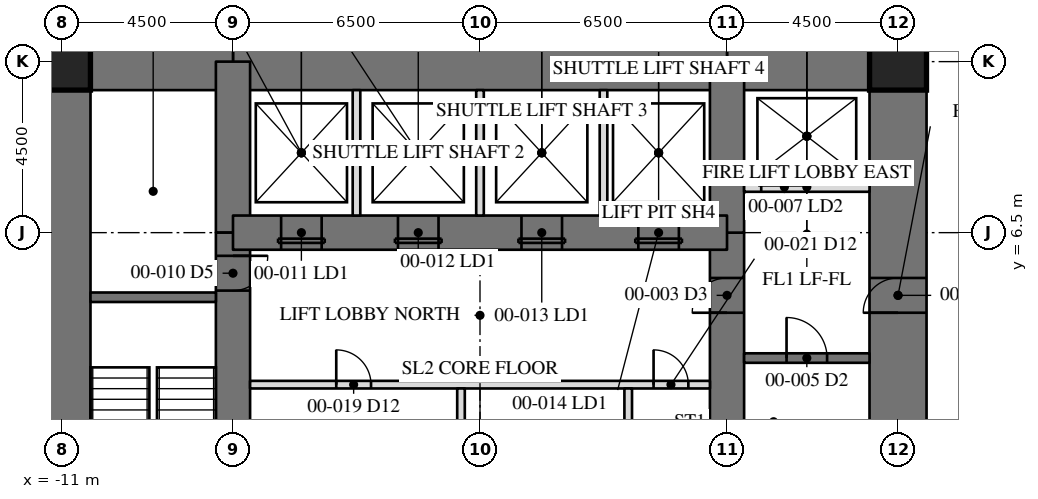
"""IFC4 building model, lengths in metres.
Left out: names, types, materials, properties, quantities, classifications, styles, units other than length and angle.
Written with IfcOpenShell. Run it as: python <this file> out.ifc"""

import sys

from ifc_helpers import new_model, si_unit, direction, frame, frame_2d, origin, origin_2d, place, context, subcontext, project, spatial, rectangle, hollow_rectangle, extrude, element, fill, save


model = new_model("IFC4")
c1 = context("Model", 3, precision=1e-05, world=origin(), true_north=direction((0.0, 1.0)))
c2 = subcontext(c1, "Body", "Model", "MODEL_VIEW")
j1 = project(units=[si_unit("LENGTHUNIT", "METRE"), si_unit("PLANEANGLEUNIT", "RADIAN")], contexts=[c1])
p1 = place(None, origin())
s1 = spatial("IfcSite", under=j1, at=p1, CompositionType="ELEMENT")
p2 = place(p1, origin())
s2 = spatial("IfcBuilding", under=s1, at=p2, CompositionType="ELEMENT")
p3 = place(p2, origin())
s3 = spatial("IfcBuildingStorey", under=s2, at=p3, CompositionType="ELEMENT", Elevation=0.0)
p4 = place(p3, frame((11.0, -11.0, -0.3), z_axis=(0.0, 0.0, 1.0), x_axis=(0.0, 1.0, 0.0)))
e1 = element("IfcWall", 1, at=p4, inside=s3, PredefinedType="SHEAR", context=c2, shape_type="SweptSolid", body=[
    extrude(rectangle(XDim=22.0, YDim=1.5, at=frame_2d((11.0, 0.0))), origin(), (0.0, 0.0, 1.0), 6.3),
])
p5 = place(p4, frame((15.393, 0.0, 0.3)))
e2 = element("IfcOpeningElement", 2, at=p5, cuts=e1, PredefinedType="OPENING", context=c2, shape_type="SweptSolid", body=[
    extrude(rectangle(XDim=0.915, YDim=2.134, at=frame_2d((0.458, 1.067))), frame((0.0, 0.76, 0.0), z_axis=(0.0, -1.0, 0.0), x_axis=(1.0, 0.0, 0.0)), (0.0, 0.0, 1.0), 1.52),
])
p6 = place(p3, frame((-11.0, 11.0, -0.3), z_axis=(0.0, 0.0, 1.0), x_axis=(0.0, -1.0, 0.0)))
e3 = element("IfcWall", 3, at=p6, inside=s3, PredefinedType="SHEAR", context=c2, shape_type="SweptSolid", body=[
    extrude(rectangle(XDim=22.0, YDim=1.5, at=frame_2d((11.0, 0.0))), origin(), (0.0, 0.0, 1.0), 6.3),
])
p7 = place(p6, frame((15.393, 0.0, 0.3)))
e4 = element("IfcOpeningElement", 4, at=p7, cuts=e3, PredefinedType="OPENING", context=c2, shape_type="SweptSolid", body=[
    extrude(rectangle(XDim=0.915, YDim=2.134, at=frame_2d((0.458, 1.067))), frame((0.0, 0.76, 0.0), z_axis=(0.0, -1.0, 0.0), x_axis=(1.0, 0.0, 0.0)), (0.0, 0.0, 1.0), 1.52),
])
p8 = place(p3, frame((11.0, 11.0, -0.3), z_axis=(0.0, 0.0, 1.0), x_axis=(-1.0, 0.0, 0.0)))
e5 = element("IfcWall", 5, at=p8, inside=s3, PredefinedType="SHEAR", context=c2, shape_type="SweptSolid", body=[
    extrude(rectangle(XDim=4.5, YDim=1.5, at=frame_2d((2.25, 0.0))), origin(), (0.0, 0.0, 1.0), 6.3),
])
p9 = place(p3, frame((6.5, 11.0, -0.3), z_axis=(0.0, 0.0, 1.0), x_axis=(-1.0, 0.0, 0.0)))
e6 = element("IfcWall", 6, at=p9, inside=s3, PredefinedType="SHEAR", context=c2, shape_type="SweptSolid", body=[
    extrude(rectangle(XDim=13.0, YDim=1.5, at=frame_2d((6.5, 0.0))), origin(), (0.0, 0.0, 1.0), 6.3),
])
p10 = place(p3, frame((-6.5, 11.0, -0.3), z_axis=(0.0, 0.0, 1.0), x_axis=(-1.0, 0.0, 0.0)))
e7 = element("IfcWall", 7, at=p10, inside=s3, PredefinedType="SHEAR", context=c2, shape_type="SweptSolid", body=[
    extrude(rectangle(XDim=4.5, YDim=1.5, at=frame_2d((2.25, 0.0))), origin(), (0.0, 0.0, 1.0), 6.3),
])
p11 = place(p3, frame((6.5, -6.5, -0.3), z_axis=(0.0, 0.0, 1.0), x_axis=(0.0, 1.0, 0.0)))
e8 = element("IfcWall", 8, at=p11, inside=s3, PredefinedType="SHEAR", context=c2, shape_type="SweptSolid", body=[
    extrude(rectangle(XDim=13.0, YDim=0.9, at=frame_2d((6.5, 0.0))), origin(), (0.0, 0.0, 1.0), 6.3),
])
p12 = place(p11, frame((10.893, 0.0, 0.3)))
e9 = element("IfcOpeningElement", 9, at=p12, cuts=e8, PredefinedType="OPENING", context=c2, shape_type="SweptSolid", body=[
    extrude(rectangle(XDim=0.915, YDim=2.134, at=frame_2d((0.458, 1.067))), frame((0.0, 0.46, 0.0), z_axis=(0.0, -1.0, 0.0), x_axis=(1.0, 0.0, 0.0)), (0.0, 0.0, 1.0), 0.92),
])
p13 = place(p11, frame((0.61, 0.0, 0.3)))
e10 = element("IfcOpeningElement", 10, at=p13, cuts=e8, PredefinedType="OPENING", context=c2, shape_type="SweptSolid", body=[
    extrude(rectangle(XDim=0.915, YDim=2.134, at=frame_2d((0.458, 1.067))), frame((0.0, 0.46, 0.0), z_axis=(0.0, -1.0, 0.0), x_axis=(1.0, 0.0, 0.0)), (0.0, 0.0, 1.0), 0.92),
])
for number, where, z_axis, x_axis in (
    (11, (6.5, 6.5, -0.3), (0.0, 0.0, 1.0), (0.0, 1.0, 0.0)),
    (12, (-6.5, 11.0, -0.3), (0.0, 0.0, 1.0), (0.0, -1.0, 0.0)),
):
    element("IfcWall", number, at=place(p3, frame(where, z_axis=z_axis, x_axis=x_axis)), inside=s3, PredefinedType="SHEAR", context=c2, shape_type="SweptSolid", body=[
        extrude(rectangle(XDim=4.5, YDim=0.9, at=frame_2d((2.25, 0.0))), origin(), (0.0, 0.0, 1.0), 6.3),
    ])
p14 = place(p3, frame((-6.5, 6.5, -0.3), z_axis=(0.0, 0.0, 1.0), x_axis=(0.0, -1.0, 0.0)))
e13 = element("IfcWall", 13, at=p14, inside=s3, PredefinedType="SHEAR", context=c2, shape_type="SweptSolid", body=[
    extrude(rectangle(XDim=13.0, YDim=0.9, at=frame_2d((6.5, 0.0))), origin(), (0.0, 0.0, 1.0), 6.3),
])
p15 = place(p14, frame((10.893, 0.0, 0.3)))
e14 = element("IfcOpeningElement", 14, at=p15, cuts=e13, PredefinedType="OPENING", context=c2, shape_type="SweptSolid", body=[
    extrude(rectangle(XDim=0.915, YDim=2.134, at=frame_2d((0.458, 1.067))), frame((0.0, 0.46, 0.0), z_axis=(0.0, -1.0, 0.0), x_axis=(1.0, 0.0, 0.0)), (0.0, 0.0, 1.0), 0.92),
])
p16 = place(p14, frame((0.61, 0.0, 0.3)))
e15 = element("IfcOpeningElement", 15, at=p16, cuts=e13, PredefinedType="OPENING", context=c2, shape_type="SweptSolid", body=[
    extrude(rectangle(XDim=0.915, YDim=2.134, at=frame_2d((0.458, 1.067))), frame((0.0, 0.46, 0.0), z_axis=(0.0, -1.0, 0.0), x_axis=(1.0, 0.0, 0.0)), (0.0, 0.0, 1.0), 0.92),
])
p17 = place(p3, frame((6.5, 6.5, -0.3), z_axis=(0.0, 0.0, 1.0), x_axis=(-1.0, 0.0, 0.0)))
e16 = element("IfcWall", 16, at=p17, inside=s3, PredefinedType="SHEAR", context=c2, shape_type="SweptSolid", body=[
    extrude(rectangle(XDim=13.0, YDim=0.9, at=frame_2d((6.5, 0.0))), origin(), (0.0, 0.0, 1.0), 6.3),
])
p18 = place(p17, frame((10.667, 0.0, 0.3)))
e17 = element("IfcOpeningElement", 17, at=p18, cuts=e16, PredefinedType="OPENING", context=c2, shape_type="SweptSolid", body=[
    extrude(rectangle(XDim=1.067, YDim=2.134, at=frame_2d((0.533, 1.067))), frame((0.0, 0.46, 0.0), z_axis=(0.0, -1.0, 0.0), x_axis=(1.0, 0.0, 0.0)), (0.0, 0.0, 1.0), 0.92),
])
p19 = place(p17, frame((7.592, 0.0, 0.3)))
e18 = element("IfcOpeningElement", 18, at=p19, cuts=e16, PredefinedType="OPENING", context=c2, shape_type="SweptSolid", body=[
    extrude(rectangle(XDim=1.067, YDim=2.134, at=frame_2d((0.533, 1.067))), frame((0.0, 0.46, 0.0), z_axis=(0.0, -1.0, 0.0), x_axis=(1.0, 0.0, 0.0)), (0.0, 0.0, 1.0), 0.92),
])
p20 = place(p17, frame((4.342, 0.0, 0.3)))
e19 = element("IfcOpeningElement", 19, at=p20, cuts=e16, PredefinedType="OPENING", context=c2, shape_type="SweptSolid", body=[
    extrude(rectangle(XDim=1.067, YDim=2.134, at=frame_2d((0.533, 1.067))), frame((0.0, 0.46, 0.0), z_axis=(0.0, -1.0, 0.0), x_axis=(1.0, 0.0, 0.0)), (0.0, 0.0, 1.0), 0.92),
])
p21 = place(p17, frame((1.267, 0.0, 0.3)))
e20 = element("IfcOpeningElement", 20, at=p21, cuts=e16, PredefinedType="OPENING", context=c2, shape_type="SweptSolid", body=[
    extrude(rectangle(XDim=1.067, YDim=2.134, at=frame_2d((0.533, 1.067))), frame((0.0, 0.46, 0.0), z_axis=(0.0, -1.0, 0.0), x_axis=(1.0, 0.0, 0.0)), (0.0, 0.0, 1.0), 0.92),
])
for number, where, z_axis, x_axis in (
    (21, (11.0, 11.0, -0.3), (0.0, 0.0, 1.0), (1.0, 0.0, 0.0)),
    (22, (-11.0, 11.0, -0.3), (0.0, 0.0, 1.0), (1.0, 0.0, 0.0)),
):
    element("IfcColumn", number, at=place(p3, frame(where, z_axis=z_axis, x_axis=x_axis)), inside=s3, PredefinedType="COLUMN", context=c2, shape_type="SweptSolid", body=[
        extrude(hollow_rectangle(XDim=1.499, YDim=1.499, WallThickness=0.102, at=origin_2d()), origin(), (0.0, 0.0, 1.0), 6.3),
    ])
p22 = place(p3, frame((-6.95, 4.8, 0.0), z_axis=(0.0, 0.0, 1.0), x_axis=(-1.0, 0.0, 0.0)))
e23 = element("IfcWall", 23, at=p22, inside=s3, PredefinedType="SOLIDWALL", context=c2, shape_type="SweptSolid", body=[
    extrude(rectangle(XDim=3.3, YDim=0.25, at=frame_2d((1.65, 0.0))), origin(), (0.0, 0.0, 1.0), 5.81),
])
p23 = place(p3, frame((6.95, 3.2, 0.0), z_axis=(0.0, 0.0, 1.0), x_axis=(1.0, 0.0, 0.0)))
e24 = element("IfcWall", 24, at=p23, inside=s3, PredefinedType="SOLIDWALL", context=c2, shape_type="SweptSolid", body=[
    extrude(rectangle(XDim=3.3, YDim=0.25, at=frame_2d((1.65, 0.0))), origin(), (0.0, 0.0, 1.0), 5.81),
])
p24 = place(p23, frame((1.116, 0.0, 0.3)))
e25 = element("IfcOpeningElement", 25, at=p24, cuts=e24, PredefinedType="OPENING", context=c2, shape_type="SweptSolid", body=[
    extrude(rectangle(XDim=1.067, YDim=2.134, at=frame_2d((0.533, 1.067))), frame((0.0, 0.135, 0.0), z_axis=(0.0, -1.0, 0.0), x_axis=(1.0, 0.0, 0.0)), (0.0, 0.0, 1.0), 0.27),
])
p25 = place(p3, frame((6.95, 7.7, 0.0), z_axis=(0.0, 0.0, 1.0), x_axis=(1.0, 0.0, 0.0)))
e26 = element("IfcWall", 26, at=p25, inside=s3, PredefinedType="PARTITIONING", context=c2, shape_type="SweptSolid", body=[
    extrude(rectangle(XDim=3.3, YDim=0.25, at=frame_2d((1.65, 0.0))), origin(), (0.0, 0.0, 1.0), 5.81),
])
p26 = place(p25, frame((0.45, 0.0, 0.3)))
e27 = element("IfcOpeningElement", 27, at=p26, cuts=e26, PredefinedType="OPENING", context=c2, shape_type="SweptSolid", body=[
    extrude(rectangle(XDim=1.219, YDim=2.134, at=frame_2d((0.609, 1.067))), frame((0.0, 0.135, 0.0), z_axis=(0.0, -1.0, 0.0), x_axis=(1.0, 0.0, 0.0)), (0.0, 0.0, 1.0), 0.27),
])
p27 = place(p3, frame((-6.05, 2.5, 0.0), z_axis=(0.0, 0.0, 1.0), x_axis=(1.0, 0.0, 0.0)))
e28 = element("IfcWall", 28, at=p27, inside=s3, PredefinedType="PARTITIONING", context=c2, shape_type="SweptSolid", body=[
    extrude(rectangle(XDim=12.1, YDim=0.2, at=frame_2d((6.05, 0.0))), origin(), (0.0, 0.0, 1.0), 5.81),
])
p28 = place(p27, frame((2.268, 0.0, 0.3)))
e29 = element("IfcOpeningElement", 29, at=p28, cuts=e28, PredefinedType="OPENING", context=c2, shape_type="SweptSolid", body=[
    extrude(rectangle(XDim=0.915, YDim=2.134, at=frame_2d((0.458, 1.067))), frame((0.0, 0.11, 0.0), z_axis=(0.0, -1.0, 0.0), x_axis=(1.0, 0.0, 0.0)), (0.0, 0.0, 1.0), 0.22),
])
p29 = place(p27, frame((10.617, 0.0, 0.3)))
e30 = element("IfcOpeningElement", 30, at=p29, cuts=e28, PredefinedType="OPENING", context=c2, shape_type="SweptSolid", body=[
    extrude(rectangle(XDim=0.915, YDim=2.134, at=frame_2d((0.458, 1.067))), frame((0.0, 0.11, 0.0), z_axis=(0.0, -1.0, 0.0), x_axis=(1.0, 0.0, 0.0)), (0.0, 0.0, 1.0), 0.22),
])
for number, where, z_axis, x_axis in (
    (31, (-3.25, 6.95, 0.0), (0.0, 0.0, 1.0), (0.0, 1.0, 0.0)),
    (32, (0.0, 6.95, 0.0), (0.0, 0.0, 1.0), (0.0, 1.0, 0.0)),
    (33, (3.25, 6.95, 0.0), (0.0, 0.0, 1.0), (0.0, 1.0, 0.0)),
):
    element("IfcWall", number, at=place(p3, frame(where, z_axis=z_axis, x_axis=x_axis)), inside=s3, PredefinedType="PARTITIONING", context=c2, shape_type="SweptSolid", body=[
        extrude(rectangle(XDim=3.3, YDim=0.2, at=frame_2d((1.65, 0.0))), origin(), (0.0, 0.0, 1.0), 5.81),
    ])
for number, where, z_axis, x_axis in (
    (34, (-0.5, -2.4, 0.0), (0.0, 0.0, 1.0), (0.0, 1.0, 0.0)),
    (35, (3.9, -2.4, 0.0), (0.0, 0.0, 1.0), (0.0, 1.0, 0.0)),
):
    element("IfcWall", number, at=place(p3, frame(where, z_axis=z_axis, x_axis=x_axis)), inside=s3, PredefinedType="PARTITIONING", context=c2, shape_type="SweptSolid", body=[
        extrude(rectangle(XDim=4.8, YDim=0.2, at=frame_2d((2.4, 0.0))), origin(), (0.0, 0.0, 1.0), 5.81),
    ])
p30 = place(p5, origin())
e36 = element("IfcDoor", 36, at=p30, inside=s3, OperationType="SINGLE_SWING_RIGHT", PredefinedType="DOOR", context=c2, shape_type="SweptSolid", body=[
    extrude(rectangle(XDim=0.915, YDim=2.134, at=frame_2d((0.458, 1.067))), frame((0.0, -0.675, 0.0), z_axis=(0.0, -1.0, 0.0), x_axis=(1.0, 0.0, 0.0)), (0.0, 0.0, 1.0), 0.05),
])
fill(e2, e36)
p31 = place(p12, origin())
e37 = element("IfcDoor", 37, at=p31, inside=s3, OperationType="SINGLE_SWING_RIGHT", PredefinedType="DOOR", context=c2, shape_type="SweptSolid", body=[
    extrude(rectangle(XDim=0.915, YDim=2.134, at=frame_2d((0.458, 1.067))), frame((0.0, -0.375, 0.0), z_axis=(0.0, -1.0, 0.0), x_axis=(1.0, 0.0, 0.0)), (0.0, 0.0, 1.0), 0.05),
])
fill(e9, e37)
p32 = place(p24, origin())
e38 = element("IfcDoor", 38, at=p32, inside=s3, OperationType="SINGLE_SWING_LEFT", PredefinedType="DOOR", context=c2, shape_type="SweptSolid", body=[
    extrude(rectangle(XDim=1.067, YDim=2.134, at=frame_2d((0.533, 1.067))), frame((0.0, 0.025, 0.0), z_axis=(0.0, -1.0, 0.0), x_axis=(1.0, 0.0, 0.0)), (0.0, 0.0, 1.0), 0.05),
])
fill(e25, e38)
p33 = place(p26, origin())
e39 = element("IfcDoor", 39, at=p33, inside=s3, OperationType="SLIDING_TO_LEFT", PredefinedType="DOOR", context=c2, shape_type="SweptSolid", body=[
    extrude(rectangle(XDim=1.219, YDim=2.134, at=frame_2d((0.609, 1.067))), frame((0.0, 0.025, 0.0), z_axis=(0.0, -1.0, 0.0), x_axis=(1.0, 0.0, 0.0)), (0.0, 0.0, 1.0), 0.05),
])
fill(e27, e39)
p34 = place(p16, origin())
e40 = element("IfcDoor", 40, at=p34, inside=s3, OperationType="SINGLE_SWING_RIGHT", PredefinedType="DOOR", context=c2, shape_type="SweptSolid", body=[
    extrude(rectangle(XDim=0.915, YDim=2.134, at=frame_2d((0.458, 1.067))), frame((0.0, -0.375, 0.0), z_axis=(0.0, -1.0, 0.0), x_axis=(1.0, 0.0, 0.0)), (0.0, 0.0, 1.0), 0.05),
])
fill(e15, e40)
p35 = place(p18, origin())
e41 = element("IfcDoor", 41, at=p35, inside=s3, OperationType="SLIDING_TO_LEFT", PredefinedType="DOOR", context=c2, shape_type="SweptSolid", body=[
    extrude(rectangle(XDim=1.067, YDim=2.134, at=frame_2d((0.533, 1.067))), frame((0.0, -0.375, 0.0), z_axis=(0.0, -1.0, 0.0), x_axis=(1.0, 0.0, 0.0)), (0.0, 0.0, 1.0), 0.05),
])
fill(e17, e41)
p36 = place(p19, origin())
e42 = element("IfcDoor", 42, at=p36, inside=s3, OperationType="SLIDING_TO_LEFT", PredefinedType="DOOR", context=c2, shape_type="SweptSolid", body=[
    extrude(rectangle(XDim=1.067, YDim=2.134, at=frame_2d((0.533, 1.067))), frame((0.0, -0.375, 0.0), z_axis=(0.0, -1.0, 0.0), x_axis=(1.0, 0.0, 0.0)), (0.0, 0.0, 1.0), 0.05),
])
fill(e18, e42)
p37 = place(p20, origin())
e43 = element("IfcDoor", 43, at=p37, inside=s3, OperationType="SLIDING_TO_LEFT", PredefinedType="DOOR", context=c2, shape_type="SweptSolid", body=[
    extrude(rectangle(XDim=1.067, YDim=2.134, at=frame_2d((0.533, 1.067))), frame((0.0, -0.375, 0.0), z_axis=(0.0, -1.0, 0.0), x_axis=(1.0, 0.0, 0.0)), (0.0, 0.0, 1.0), 0.05),
])
fill(e19, e43)
p38 = place(p21, origin())
e44 = element("IfcDoor", 44, at=p38, inside=s3, OperationType="SLIDING_TO_LEFT", PredefinedType="DOOR", context=c2, shape_type="SweptSolid", body=[
    extrude(rectangle(XDim=1.067, YDim=2.134, at=frame_2d((0.533, 1.067))), frame((0.0, -0.375, 0.0), z_axis=(0.0, -1.0, 0.0), x_axis=(1.0, 0.0, 0.0)), (0.0, 0.0, 1.0), 0.05),
])
fill(e20, e44)
p39 = place(p28, origin())
e45 = element("IfcDoor", 45, at=p39, inside=s3, OperationType="SINGLE_SWING_LEFT", PredefinedType="DOOR", context=c2, shape_type="SweptSolid", body=[
    extrude(rectangle(XDim=0.915, YDim=2.134, at=frame_2d((0.458, 1.067))), frame((0.0, 0.025, 0.0), z_axis=(0.0, -1.0, 0.0), x_axis=(1.0, 0.0, 0.0)), (0.0, 0.0, 1.0), 0.05),
])
fill(e29, e45)
p40 = place(p29, origin())
e46 = element("IfcDoor", 46, at=p40, inside=s3, OperationType="SINGLE_SWING_LEFT", PredefinedType="DOOR", context=c2, shape_type="SweptSolid", body=[
    extrude(rectangle(XDim=0.915, YDim=2.134, at=frame_2d((0.458, 1.067))), frame((0.0, 0.025, 0.0), z_axis=(0.0, -1.0, 0.0), x_axis=(1.0, 0.0, 0.0)), (0.0, 0.0, 1.0), 0.05),
])
fill(e30, e46)
save(model, sys.argv[1])
